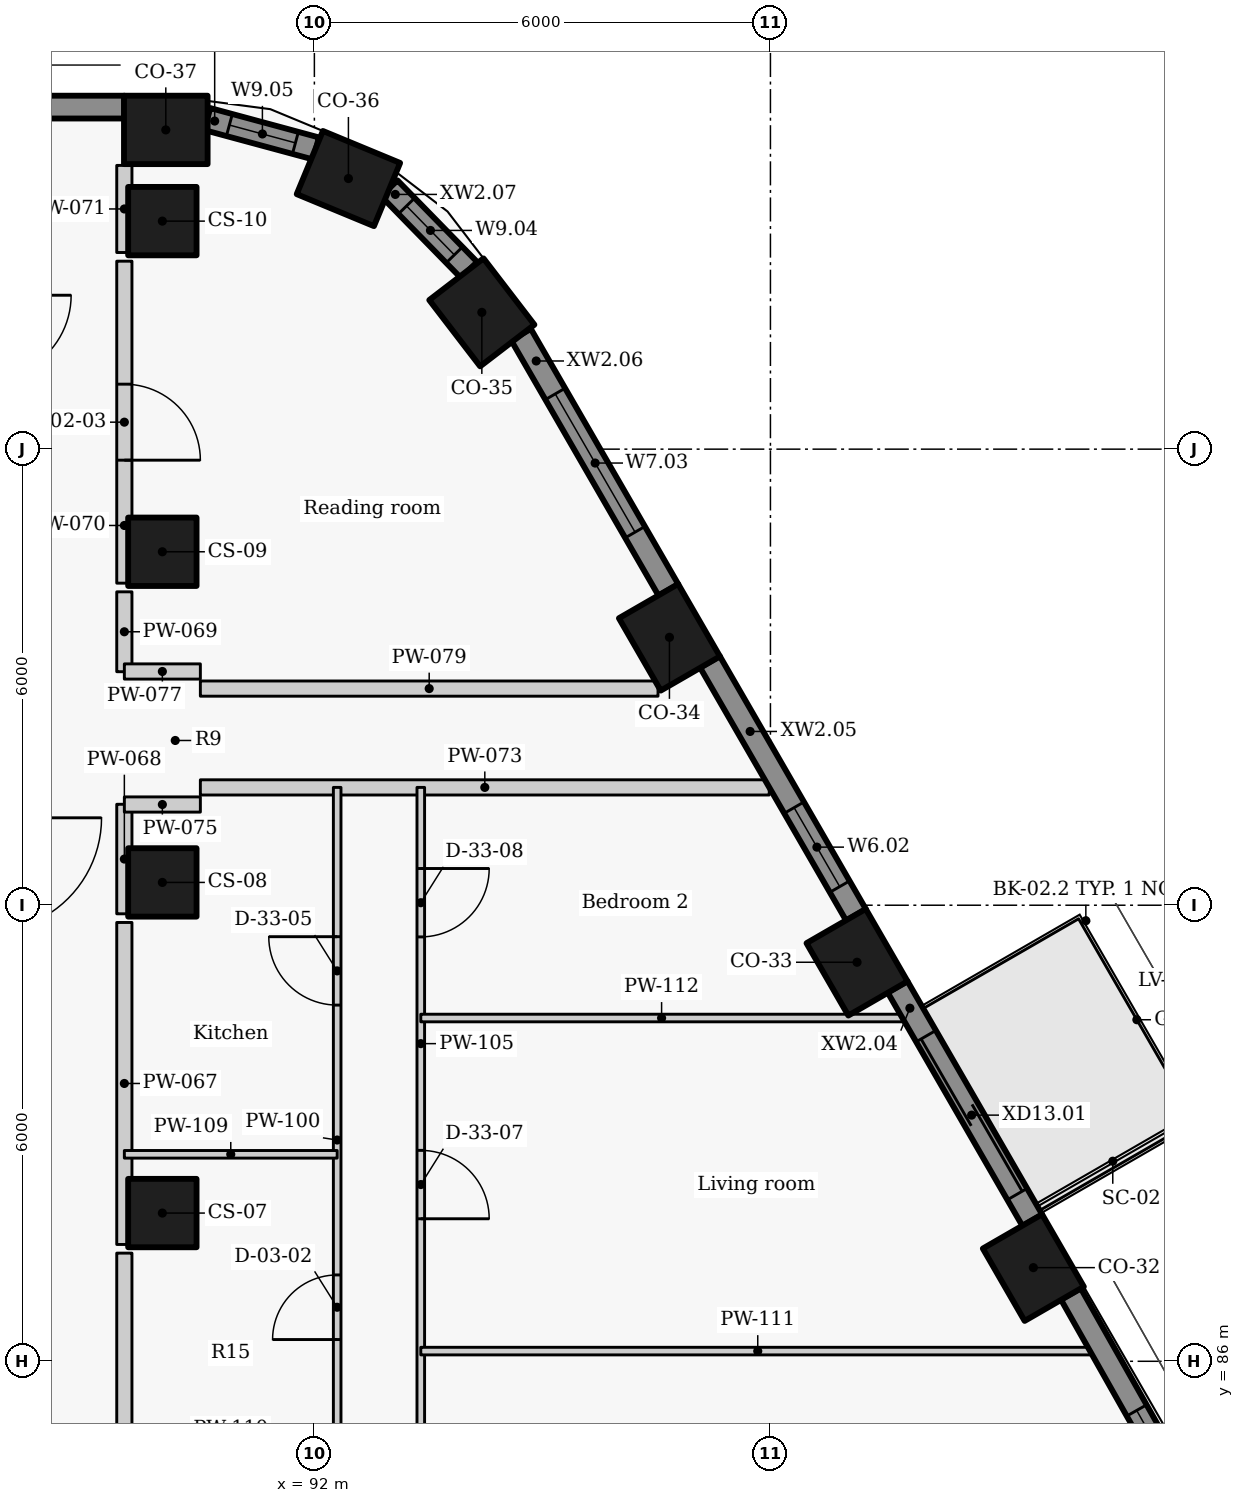
"""IFC4 building model, lengths in metres.
Left out: names, types, materials, properties, quantities, classifications, styles, units other than length and angle.
Written with IfcOpenShell. Run it as: python <this file> out.ifc"""

import sys

from ifc_helpers import new_model, si_unit, direction, frame, frame_2d, origin, origin_2d, place, context, subcontext, project, spatial, rectangle, extrude, element, fill, save


model = new_model("IFC4")
c1 = context("Model", 3, precision=1e-05, world=origin(), true_north=direction((0.0, 1.0)))
c2 = subcontext(c1, "Body", "Model", "MODEL_VIEW")
j1 = project(units=[si_unit("LENGTHUNIT", "METRE"), si_unit("PLANEANGLEUNIT", "RADIAN")], contexts=[c1])
p1 = place(None, origin())
s1 = spatial("IfcSite", under=j1, at=p1, CompositionType="ELEMENT")
p2 = place(p1, origin())
s2 = spatial("IfcBuilding", under=s1, at=p2, CompositionType="ELEMENT")
p3 = place(p2, frame((0.0, 0.0, 226.2)))
s3 = spatial("IfcBuildingStorey", under=s2, at=p3, CompositionType="ELEMENT", Elevation=226.2)
for number, where, z_axis, x_axis in (
    (1, (101.459, 87.232, 0.0), (0.0, 0.0, 1.0), (-0.5, 0.866, 0.0)),
    (2, (99.139, 91.25, 0.0), (0.0, 0.0, 1.0), (-0.5, 0.866, 0.0)),
    (3, (96.671, 95.525, 0.0), (0.0, 0.0, 1.0), (-0.5, 0.866, 0.0)),
    (4, (94.203, 99.8, 0.0), (0.0, 0.0, 1.0), (-0.609, 0.793, 0.0)),
    (5, (92.448, 101.56, 0.0), (0.0, 0.0, 1.0), (-0.924, 0.383, 0.0)),
    (6, (90.045, 102.2, 0.0), (0.0, 0.0, 1.0), (-1.0, 0.0, 0.0)),
):
    element("IfcColumn", number, at=place(p3, frame(where, z_axis=z_axis, x_axis=x_axis)), inside=s3, PredefinedType="COLUMN", context=c2, shape_type="SweptSolid", body=[
        extrude(rectangle(XDim=1.1, YDim=0.9, at=origin_2d()), origin(), (0.0, 0.0, 1.0), 3.3),
    ])
for number, where, z_axis, x_axis in (
    (7, (90.0, 87.95, 0.0), (0.0, 0.0, 1.0), (0.0, 1.0, 0.0)),
    (8, (90.0, 92.3, 0.0), (0.0, 0.0, 1.0), (0.0, 1.0, 0.0)),
    (9, (90.0, 96.65, 0.0), (0.0, 0.0, 1.0), (0.0, 1.0, 0.0)),
    (10, (90.0, 101.0, 0.0), (0.0, 0.0, 1.0), (0.0, 1.0, 0.0)),
):
    element("IfcColumn", number, at=place(p3, frame(where, z_axis=z_axis, x_axis=x_axis)), inside=s3, PredefinedType="COLUMN", context=c2, shape_type="SweptSolid", body=[
        extrude(rectangle(XDim=0.9, YDim=0.9, at=origin_2d()), origin(), (0.0, 0.0, 1.0), 3.3),
    ])
p4 = place(p3, frame((104.627, 82.154, 0.0), z_axis=(0.0, 0.0, 1.0), x_axis=(-0.492080931903, 0.870549456641, 0.0)))
e11 = element("IfcWall", 11, at=p4, inside=s3, PredefinedType="SOLIDWALL", context=c2, shape_type="SweptSolid", body=[
    extrude(rectangle(XDim=5.437, YDim=0.3, at=frame_2d((2.718, 0.0))), origin(), (0.0, 0.0, 1.0), 2.425),
])
p5 = place(p4, frame((2.176, 0.0, 0.9)))
e12 = element("IfcOpeningElement", 12, at=p5, cuts=e11, PredefinedType="OPENING", context=c2, shape_type="SweptSolid", body=[
    extrude(rectangle(XDim=1.5, YDim=1.1, at=frame_2d((0.75, 0.55))), frame((0.0, 0.16, 0.0), z_axis=(0.0, -1.0, 0.0), x_axis=(1.0, 0.0, 0.0)), (0.0, 0.0, 1.0), 0.32),
])
p6 = place(p3, frame((101.446, 87.855, 0.0), z_axis=(0.0, 0.0, 1.0), x_axis=(-0.500010404316, 0.866019396766, 0.0)))
e13 = element("IfcWall", 13, at=p6, inside=s3, PredefinedType="SOLIDWALL", context=c2, shape_type="SweptSolid", body=[
    extrude(rectangle(XDim=3.547, YDim=0.3, at=frame_2d((1.774, 0.0))), origin(), (0.0, 0.0, 1.0), 2.425),
])
p7 = place(p6, frame((0.397, 0.0, 0.0)))
e14 = element("IfcOpeningElement", 14, at=p7, cuts=e13, PredefinedType="OPENING", context=c2, shape_type="SweptSolid", body=[
    extrude(rectangle(XDim=2.4, YDim=2.0, at=frame_2d((1.2, 1.0))), frame((0.0, 0.16, 0.0), z_axis=(0.0, -1.0, 0.0), x_axis=(1.0, 0.0, 0.0)), (0.0, 0.0, 1.0), 0.32),
])
p8 = place(p3, frame((99.126, 91.873, 0.0), z_axis=(0.0, 0.0, 1.0), x_axis=(-0.499984490703, 0.866034357896, 0.0)))
e15 = element("IfcWall", 15, at=p8, inside=s3, PredefinedType="SOLIDWALL", context=c2, shape_type="SweptSolid", body=[
    extrude(rectangle(XDim=3.844, YDim=0.3, at=frame_2d((1.922, 0.0))), origin(), (0.0, 0.0, 1.0), 2.425),
])
p9 = place(p8, frame((0.43, 0.0, 0.9)))
e16 = element("IfcOpeningElement", 16, at=p9, cuts=e15, PredefinedType="OPENING", context=c2, shape_type="SweptSolid", body=[
    extrude(rectangle(XDim=1.2, YDim=1.1, at=frame_2d((0.6, 0.55))), frame((0.0, 0.16, 0.0), z_axis=(0.0, -1.0, 0.0), x_axis=(1.0, 0.0, 0.0)), (0.0, 0.0, 1.0), 0.32),
])
p10 = place(p3, frame((96.658, 96.147, 0.0), z_axis=(0.0, 0.0, 1.0), x_axis=(-0.500011218404, 0.866018926739, 0.0)))
e17 = element("IfcWall", 17, at=p10, inside=s3, PredefinedType="SOLIDWALL", context=c2, shape_type="SweptSolid", body=[
    extrude(rectangle(XDim=3.879, YDim=0.3, at=frame_2d((1.939, 0.0))), origin(), (0.0, 0.0, 1.0), 2.425),
])
p11 = place(p10, frame((0.878, 0.0, 0.9)))
e18 = element("IfcOpeningElement", 18, at=p11, cuts=e17, PredefinedType="OPENING", context=c2, shape_type="SweptSolid", body=[
    extrude(rectangle(XDim=2.1, YDim=1.1, at=frame_2d((1.05, 0.55))), frame((0.0, 0.16, 0.0), z_axis=(0.0, -1.0, 0.0), x_axis=(1.0, 0.0, 0.0)), (0.0, 0.0, 1.0), 0.32),
])
p12 = place(p3, frame((94.034, 100.358, 0.0), z_axis=(0.0, 0.0, 1.0), x_axis=(-0.698675602211, 0.71543860874, 0.0)))
e19 = element("IfcWall", 19, at=p12, inside=s3, PredefinedType="SOLIDWALL", context=c2, shape_type="SweptSolid", body=[
    extrude(rectangle(XDim=1.5, YDim=0.3, at=frame_2d((0.75, 0.0))), origin(), (0.0, 0.0, 1.0), 2.425),
])
p13 = place(p12, frame((0.276, 0.0, 0.9)))
e20 = element("IfcOpeningElement", 20, at=p13, cuts=e19, PredefinedType="OPENING", context=c2, shape_type="SweptSolid", body=[
    extrude(rectangle(XDim=0.9, YDim=1.1, at=frame_2d((0.45, 0.55))), frame((0.0, 0.16, 0.0), z_axis=(0.0, -1.0, 0.0), x_axis=(1.0, 0.0, 0.0)), (0.0, 0.0, 1.0), 0.32),
])
p14 = place(p3, frame((92.021, 101.956, 0.0), z_axis=(0.0, 0.0, 1.0), x_axis=(-0.965392564919, 0.260801065181, 0.0)))
e21 = element("IfcWall", 21, at=p14, inside=s3, PredefinedType="SOLIDWALL", context=c2, shape_type="SweptSolid", body=[
    extrude(rectangle(XDim=1.481, YDim=0.3, at=frame_2d((0.74, 0.0))), origin(), (0.0, 0.0, 1.0), 2.425),
])
p15 = place(p14, frame((0.28, 0.0, 0.9)))
e22 = element("IfcOpeningElement", 22, at=p15, cuts=e21, PredefinedType="OPENING", context=c2, shape_type="SweptSolid", body=[
    extrude(rectangle(XDim=0.9, YDim=1.1, at=frame_2d((0.45, 0.55))), frame((0.0, 0.16, 0.0), z_axis=(0.0, -1.0, 0.0), x_axis=(1.0, 0.0, 0.0)), (0.0, 0.0, 1.0), 0.32),
])
p16 = place(p3, frame((89.499, 102.5, 0.0), z_axis=(0.0, 0.0, 1.0), x_axis=(-1.0, 0.0, 0.0)))
e23 = element("IfcWall", 23, at=p16, inside=s3, PredefinedType="SOLIDWALL", context=c2, shape_type="SweptSolid", body=[
    extrude(rectangle(XDim=19.033, YDim=0.3, at=frame_2d((9.517, 0.0))), origin(), (0.0, 0.0, 1.0), 2.425),
])
p17 = place(p3, frame((89.5, 87.423, 0.0), z_axis=(0.0, 0.0, 1.0), x_axis=(0.0, -1.0, 0.0)))
e24 = element("IfcWall", 24, at=p17, inside=s3, PredefinedType="PARTITIONING", context=c2, shape_type="SweptSolid", body=[
    extrude(rectangle(XDim=15.786, YDim=0.2, at=frame_2d((7.893, 0.0))), origin(), (0.0, 0.0, 1.0), 3.025),
])
p18 = place(p17, frame((6.923, 0.0, 0.0)))
e25 = element("IfcOpeningElement", 25, at=p18, cuts=e24, PredefinedType="OPENING", context=c2, shape_type="SweptSolid", body=[
    extrude(rectangle(XDim=1.0, YDim=2.1, at=frame_2d((0.5, 1.05))), frame((0.0, 0.11, 0.0), z_axis=(0.0, -1.0, 0.0), x_axis=(1.0, 0.0, 0.0)), (0.0, 0.0, 1.0), 0.22),
])
p19 = place(p17, frame((3.023, 0.0, 0.0)))
e26 = element("IfcOpeningElement", 26, at=p19, cuts=e24, PredefinedType="OPENING", context=c2, shape_type="SweptSolid", body=[
    extrude(rectangle(XDim=1.0, YDim=2.1, at=frame_2d((0.5, 1.05))), frame((0.0, 0.11, 0.0), z_axis=(0.0, -1.0, 0.0), x_axis=(1.0, 0.0, 0.0)), (0.0, 0.0, 1.0), 0.22),
])
p20 = place(p3, frame((89.5, 87.537, 0.0), z_axis=(0.0, 0.0, 1.0), x_axis=(0.0, 1.0, 0.0)))
e27 = element("IfcWall", 27, at=p20, inside=s3, PredefinedType="PARTITIONING", context=c2, shape_type="SweptSolid", body=[
    extrude(rectangle(XDim=4.236, YDim=0.2, at=frame_2d((2.118, 0.0))), origin(), (0.0, 0.0, 1.0), 3.025),
])
p21 = place(p3, frame((89.5, 91.887, 0.0), z_axis=(0.0, 0.0, 1.0), x_axis=(0.0, 1.0, 0.0)))
e28 = element("IfcWall", 28, at=p21, inside=s3, PredefinedType="PARTITIONING", context=c2, shape_type="SweptSolid", body=[
    extrude(rectangle(XDim=1.441, YDim=0.2, at=frame_2d((0.72, 0.0))), origin(), (0.0, 0.0, 1.0), 3.025),
])
p22 = place(p3, frame((89.5, 95.072, 0.0), z_axis=(0.0, 0.0, 1.0), x_axis=(0.0, 1.0, 0.0)))
e29 = element("IfcWall", 29, at=p22, inside=s3, PredefinedType="PARTITIONING", context=c2, shape_type="SweptSolid", body=[
    extrude(rectangle(XDim=1.051, YDim=0.2, at=frame_2d((0.525, 0.0))), origin(), (0.0, 0.0, 1.0), 3.025),
])
p23 = place(p3, frame((89.5, 100.473, 0.0), z_axis=(0.0, 0.0, 1.0), x_axis=(0.0, -1.0, 0.0)))
e30 = element("IfcWall", 30, at=p23, inside=s3, PredefinedType="PARTITIONING", context=c2, shape_type="SweptSolid", body=[
    extrude(rectangle(XDim=4.236, YDim=0.2, at=frame_2d((2.118, 0.0))), origin(), (0.0, 0.0, 1.0), 3.025),
])
p24 = place(p23, frame((1.618, 0.0, 0.0)))
e31 = element("IfcOpeningElement", 31, at=p24, cuts=e30, PredefinedType="OPENING", context=c2, shape_type="SweptSolid", body=[
    extrude(rectangle(XDim=1.0, YDim=2.1, at=frame_2d((0.5, 1.05))), frame((0.0, 0.11, 0.0), z_axis=(0.0, -1.0, 0.0), x_axis=(1.0, 0.0, 0.0)), (0.0, 0.0, 1.0), 0.22),
])
p25 = place(p3, frame((89.5, 100.587, 0.0), z_axis=(0.0, 0.0, 1.0), x_axis=(0.0, 1.0, 0.0)))
e32 = element("IfcWall", 32, at=p25, inside=s3, PredefinedType="PARTITIONING", context=c2, shape_type="SweptSolid", body=[
    extrude(rectangle(XDim=1.146, YDim=0.2, at=frame_2d((0.573, 0.0))), origin(), (0.0, 0.0, 1.0), 3.025),
])
p26 = place(p3, frame((90.5, 93.55, 0.0), z_axis=(0.0, 0.0, 1.0), x_axis=(1.0, 0.0, 0.0)))
e33 = element("IfcWall", 33, at=p26, inside=s3, PredefinedType="PARTITIONING", context=c2, shape_type="SweptSolid", body=[
    extrude(rectangle(XDim=7.485, YDim=0.2, at=frame_2d((3.742, 0.0))), origin(), (0.0, 0.0, 1.0), 2.405),
])
for number, where, z_axis, x_axis in (
    (34, (89.5, 93.325, 0.0), (0.0, 0.0, 1.0), (1.0, 0.0, 0.0)),
    (35, (89.5, 95.075, 0.0), (0.0, 0.0, 1.0), (1.0, 0.0, 0.0)),
):
    element("IfcWall", number, at=place(p3, frame(where, z_axis=z_axis, x_axis=x_axis)), inside=s3, PredefinedType="PARTITIONING", context=c2, shape_type="SweptSolid", body=[
        extrude(rectangle(XDim=1.0, YDim=0.2, at=frame_2d((0.5, 0.0))), origin(), (0.0, 0.0, 1.0), 2.505),
    ])
p27 = place(p3, frame((90.5, 94.85, 0.0), z_axis=(0.0, 0.0, 1.0), x_axis=(1.0, 0.0, 0.0)))
e36 = element("IfcWall", 36, at=p27, inside=s3, PredefinedType="PARTITIONING", context=c2, shape_type="SweptSolid", body=[
    extrude(rectangle(XDim=6.021, YDim=0.2, at=frame_2d((3.01, 0.0))), origin(), (0.0, 0.0, 1.0), 3.025),
])
p28 = place(p3, frame((92.3, 84.7, 0.0), z_axis=(0.0, 0.0, 1.0), x_axis=(0.0, 1.0, 0.0)))
e37 = element("IfcWall", 37, at=p28, inside=s3, PredefinedType="PARTITIONING", context=c2, shape_type="SweptSolid", body=[
    extrude(rectangle(XDim=8.85, YDim=0.1, at=frame_2d((4.425, 0.0))), origin(), (0.0, 0.0, 1.0), 3.025),
])
p29 = place(p28, frame((1.586, 0.0, 0.0)))
e38 = element("IfcOpeningElement", 38, at=p29, cuts=e37, PredefinedType="OPENING", context=c2, shape_type="SweptSolid", body=[
    extrude(rectangle(XDim=0.85, YDim=2.1, at=frame_2d((0.425, 1.05))), frame((0.0, 0.06, 0.0), z_axis=(0.0, -1.0, 0.0), x_axis=(1.0, 0.0, 0.0)), (0.0, 0.0, 1.0), 0.12),
])
p30 = place(p28, frame((5.986, 0.0, 0.0)))
e39 = element("IfcOpeningElement", 39, at=p30, cuts=e37, PredefinedType="OPENING", context=c2, shape_type="SweptSolid", body=[
    extrude(rectangle(XDim=0.9, YDim=2.1, at=frame_2d((0.45, 1.05))), frame((0.0, 0.06, 0.0), z_axis=(0.0, -1.0, 0.0), x_axis=(1.0, 0.0, 0.0)), (0.0, 0.0, 1.0), 0.12),
])
p31 = place(p3, frame((93.4, 93.55, 0.0), z_axis=(0.0, 0.0, 1.0), x_axis=(0.0, -1.0, 0.0)))
e40 = element("IfcWall", 40, at=p31, inside=s3, PredefinedType="PARTITIONING", context=c2, shape_type="SweptSolid", body=[
    extrude(rectangle(XDim=10.45, YDim=0.1, at=frame_2d((5.225, 0.0))), origin(), (0.0, 0.0, 1.0), 3.025),
])
p32 = place(p31, frame((8.483, 0.0, 0.0)))
e41 = element("IfcOpeningElement", 41, at=p32, cuts=e40, PredefinedType="OPENING", context=c2, shape_type="SweptSolid", body=[
    extrude(rectangle(XDim=0.9, YDim=2.1, at=frame_2d((0.45, 1.05))), frame((0.0, 0.06, 0.0), z_axis=(0.0, -1.0, 0.0), x_axis=(1.0, 0.0, 0.0)), (0.0, 0.0, 1.0), 0.12),
])
p33 = place(p31, frame((4.775, 0.0, 0.0)))
e42 = element("IfcOpeningElement", 42, at=p33, cuts=e40, PredefinedType="OPENING", context=c2, shape_type="SweptSolid", body=[
    extrude(rectangle(XDim=0.9, YDim=2.1, at=frame_2d((0.45, 1.05))), frame((0.0, 0.06, 0.0), z_axis=(0.0, -1.0, 0.0), x_axis=(1.0, 0.0, 0.0)), (0.0, 0.0, 1.0), 0.12),
])
p34 = place(p31, frame((1.067, 0.0, 0.0)))
e43 = element("IfcOpeningElement", 43, at=p34, cuts=e40, PredefinedType="OPENING", context=c2, shape_type="SweptSolid", body=[
    extrude(rectangle(XDim=0.9, YDim=2.1, at=frame_2d((0.45, 1.05))), frame((0.0, 0.06, 0.0), z_axis=(0.0, -1.0, 0.0), x_axis=(1.0, 0.0, 0.0)), (0.0, 0.0, 1.0), 0.12),
])
p35 = place(p3, frame((89.5, 88.723, 0.0), z_axis=(0.0, 0.0, 1.0), x_axis=(1.0, 0.0, 0.0)))
e44 = element("IfcWall", 44, at=p35, inside=s3, PredefinedType="PARTITIONING", context=c2, shape_type="SweptSolid", body=[
    extrude(rectangle(XDim=2.8, YDim=0.1, at=frame_2d((1.4, 0.0))), origin(), (0.0, 0.0, 1.0), 2.505),
])
p36 = place(p3, frame((93.4, 86.134, 0.0), z_axis=(0.0, 0.0, 1.0), x_axis=(1.0, 0.0, 0.0)))
e45 = element("IfcWall", 45, at=p36, inside=s3, PredefinedType="PARTITIONING", context=c2, shape_type="SweptSolid", body=[
    extrude(rectangle(XDim=8.866, YDim=0.1, at=frame_2d((4.433, 0.0))), origin(), (0.0, 0.0, 1.0), 2.405),
])
p37 = place(p3, frame((93.4, 90.516, 0.0), z_axis=(0.0, 0.0, 1.0), x_axis=(1.0, 0.0, 0.0)))
e46 = element("IfcWall", 46, at=p37, inside=s3, PredefinedType="PARTITIONING", context=c2, shape_type="SweptSolid", body=[
    extrude(rectangle(XDim=6.336, YDim=0.1, at=frame_2d((3.168, 0.0))), origin(), (0.0, 0.0, 1.0), 2.405),
])
p38 = place(p5, origin())
e47 = element("IfcWindow", 47, at=p38, inside=s3, PartitioningType="SINGLE_PANEL", PredefinedType="WINDOW", context=c2, shape_type="SweptSolid", body=[
    extrude(rectangle(XDim=1.5, YDim=1.1, at=frame_2d((0.75, 0.55))), frame((0.0, 0.03, 0.0), z_axis=(0.0, -1.0, 0.0), x_axis=(1.0, 0.0, 0.0)), (0.0, 0.0, 1.0), 0.06),
])
fill(e12, e47)
p39 = place(p7, origin())
e48 = element("IfcDoor", 48, at=p39, inside=s3, OperationType="DOUBLE_DOOR_SLIDING", PredefinedType="DOOR", context=c2, shape_type="SweptSolid", body=[
    extrude(rectangle(XDim=2.4, YDim=2.0, at=frame_2d((1.2, 1.0))), frame((0.0, 0.025, 0.0), z_axis=(0.0, -1.0, 0.0), x_axis=(1.0, 0.0, 0.0)), (0.0, 0.0, 1.0), 0.05),
])
fill(e14, e48)
p40 = place(p9, origin())
e49 = element("IfcWindow", 49, at=p40, inside=s3, PartitioningType="SINGLE_PANEL", PredefinedType="WINDOW", context=c2, shape_type="SweptSolid", body=[
    extrude(rectangle(XDim=1.2, YDim=1.1, at=frame_2d((0.6, 0.55))), frame((0.0, 0.03, 0.0), z_axis=(0.0, -1.0, 0.0), x_axis=(1.0, 0.0, 0.0)), (0.0, 0.0, 1.0), 0.06),
])
fill(e16, e49)
p41 = place(p11, origin())
e50 = element("IfcWindow", 50, at=p41, inside=s3, PartitioningType="SINGLE_PANEL", PredefinedType="WINDOW", context=c2, shape_type="SweptSolid", body=[
    extrude(rectangle(XDim=2.1, YDim=1.1, at=frame_2d((1.05, 0.55))), frame((0.0, 0.03, 0.0), z_axis=(0.0, -1.0, 0.0), x_axis=(1.0, 0.0, 0.0)), (0.0, 0.0, 1.0), 0.06),
])
fill(e18, e50)
p42 = place(p13, origin())
e51 = element("IfcWindow", 51, at=p42, inside=s3, PartitioningType="SINGLE_PANEL", PredefinedType="WINDOW", context=c2, shape_type="SweptSolid", body=[
    extrude(rectangle(XDim=0.9, YDim=1.1, at=frame_2d((0.45, 0.55))), frame((0.0, 0.03, 0.0), z_axis=(0.0, -1.0, 0.0), x_axis=(1.0, 0.0, 0.0)), (0.0, 0.0, 1.0), 0.06),
])
fill(e20, e51)
p43 = place(p15, origin())
e52 = element("IfcWindow", 52, at=p43, inside=s3, PartitioningType="SINGLE_PANEL", PredefinedType="WINDOW", context=c2, shape_type="SweptSolid", body=[
    extrude(rectangle(XDim=0.9, YDim=1.1, at=frame_2d((0.45, 0.55))), frame((0.0, 0.03, 0.0), z_axis=(0.0, -1.0, 0.0), x_axis=(1.0, 0.0, 0.0)), (0.0, 0.0, 1.0), 0.06),
])
fill(e22, e52)
p44 = place(p29, origin())
e53 = element("IfcDoor", 53, at=p44, inside=s3, OperationType="SINGLE_SWING_LEFT", PredefinedType="DOOR", context=c2, shape_type="SweptSolid", body=[
    extrude(rectangle(XDim=0.85, YDim=2.1, at=frame_2d((0.425, 1.05))), frame((0.0, 0.025, 0.0), z_axis=(0.0, -1.0, 0.0), x_axis=(1.0, 0.0, 0.0)), (0.0, 0.0, 1.0), 0.05),
])
fill(e38, e53)
p45 = place(p30, origin())
e54 = element("IfcDoor", 54, at=p45, inside=s3, OperationType="SINGLE_SWING_RIGHT", PredefinedType="DOOR", context=c2, shape_type="SweptSolid", body=[
    extrude(rectangle(XDim=0.9, YDim=2.1, at=frame_2d((0.45, 1.05))), frame((0.0, 0.025, 0.0), z_axis=(0.0, -1.0, 0.0), x_axis=(1.0, 0.0, 0.0)), (0.0, 0.0, 1.0), 0.05),
])
fill(e39, e54)
p46 = place(p33, origin())
e55 = element("IfcDoor", 55, at=p46, inside=s3, OperationType="SINGLE_SWING_RIGHT", PredefinedType="DOOR", context=c2, shape_type="SweptSolid", body=[
    extrude(rectangle(XDim=0.9, YDim=2.1, at=frame_2d((0.45, 1.05))), frame((0.0, 0.025, 0.0), z_axis=(0.0, -1.0, 0.0), x_axis=(1.0, 0.0, 0.0)), (0.0, 0.0, 1.0), 0.05),
])
fill(e42, e55)
p47 = place(p34, origin())
e56 = element("IfcDoor", 56, at=p47, inside=s3, OperationType="SINGLE_SWING_LEFT", PredefinedType="DOOR", context=c2, shape_type="SweptSolid", body=[
    extrude(rectangle(XDim=0.9, YDim=2.1, at=frame_2d((0.45, 1.05))), frame((0.0, 0.025, 0.0), z_axis=(0.0, -1.0, 0.0), x_axis=(1.0, 0.0, 0.0)), (0.0, 0.0, 1.0), 0.05),
])
fill(e43, e56)
p48 = place(p24, origin())
e57 = element("IfcDoor", 57, at=p48, inside=s3, OperationType="SINGLE_SWING_RIGHT", PredefinedType="DOOR", context=c2, shape_type="SweptSolid", body=[
    extrude(rectangle(XDim=1.0, YDim=2.1, at=frame_2d((0.5, 1.05))), frame((0.0, 0.025, 0.0), z_axis=(0.0, -1.0, 0.0), x_axis=(1.0, 0.0, 0.0)), (0.0, 0.0, 1.0), 0.05),
])
fill(e31, e57)
save(model, sys.argv[1])
